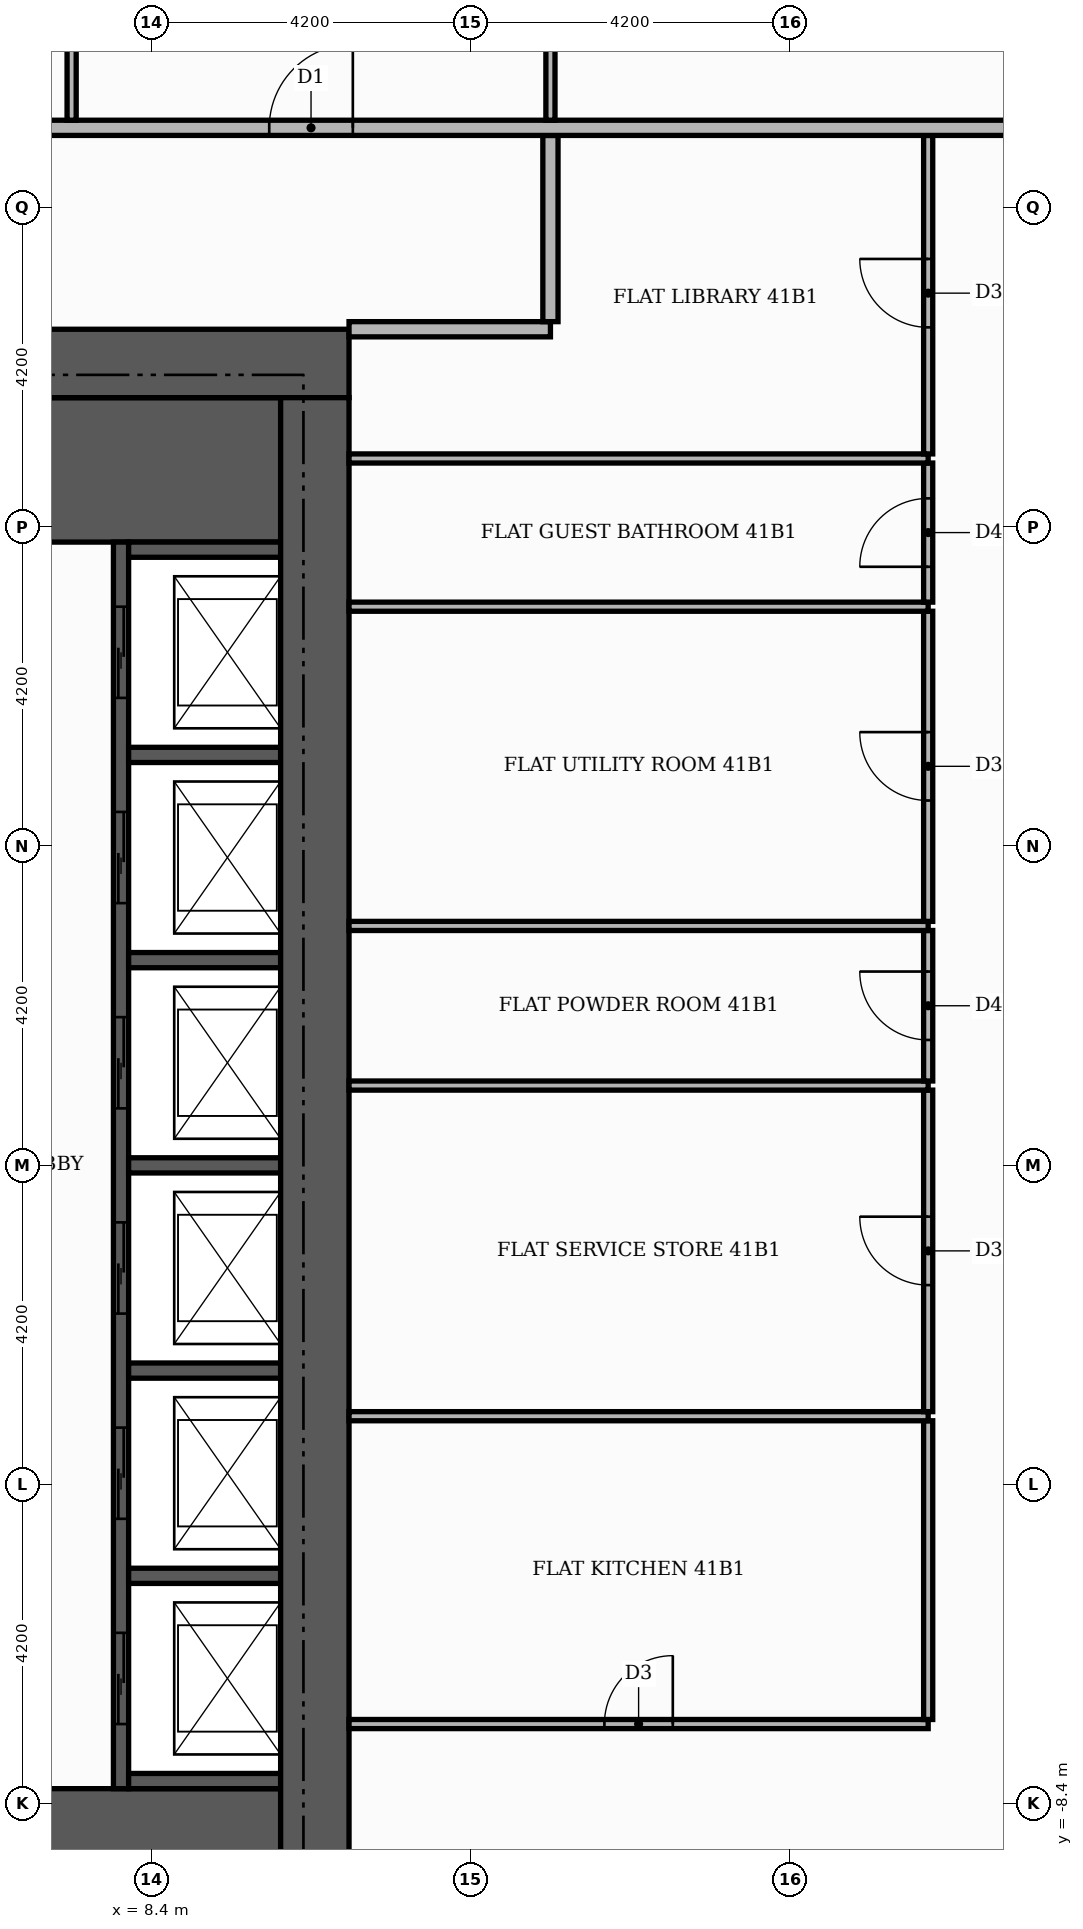
"""IFC4 building model, lengths in metres.
Left out: names, types, materials, properties, quantities, classifications, styles, units other than length and angle.
Written with IfcOpenShell. Run it as: python <this file> out.ifc"""

import sys

from ifc_helpers import new_model, si_unit, direction, frame, frame_2d, origin, place, context, subcontext, project, spatial, rectangle, extrude, element, fill, save


model = new_model("IFC4")
c1 = context("Model", 3, precision=1e-05, world=origin(), true_north=direction((0.0, 1.0)))
c2 = subcontext(c1, "Body", "Model", "MODEL_VIEW")
j1 = project(units=[si_unit("LENGTHUNIT", "METRE"), si_unit("PLANEANGLEUNIT", "RADIAN")], contexts=[c1])
p1 = place(None, origin())
s1 = spatial("IfcSite", under=j1, at=p1, CompositionType="ELEMENT")
p2 = place(p1, origin())
s2 = spatial("IfcBuilding", under=s1, at=p2, CompositionType="ELEMENT")
p3 = place(p2, frame((0.0, 0.0, 172.8)))
s3 = spatial("IfcBuildingStorey", under=s2, at=p3, CompositionType="ELEMENT", Elevation=172.8)
for number, where, z_axis, x_axis in (
    (1, (5.5, -9.15, 0.0), (0.0, 0.0, 1.0), (1.0, 0.0, 0.0)),
    (2, (5.5, 9.15, 0.0), (0.0, 0.0, 1.0), (1.0, 0.0, 0.0)),
):
    element("IfcWall", number, at=place(p3, frame(where, z_axis=z_axis, x_axis=x_axis)), inside=s3, PredefinedType="SHEAR", context=c2, shape_type="SweptSolid", body=[
        extrude(rectangle(XDim=4.6, YDim=1.9, at=frame_2d((2.3, 0.0))), origin(), (0.0, 0.0, 1.0), 3.48),
    ])
p4 = place(p3, frame((8.0, -8.2, 0.0), z_axis=(0.0, 0.0, 1.0), x_axis=(0.0, 1.0, 0.0)))
e3 = element("IfcWall", 3, at=p4, inside=s3, PredefinedType="SHEAR", context=c2, shape_type="SweptSolid", body=[
    extrude(rectangle(XDim=16.4, YDim=0.2, at=frame_2d((8.2, 0.0))), origin(), (0.0, 0.0, 1.0), 3.48),
])
p5 = place(p4, frame((0.85, 0.0, 0.0)))
e4 = element("IfcOpeningElement", 4, at=p5, cuts=e3, PredefinedType="OPENING", context=c2, shape_type="SweptSolid", body=[
    extrude(rectangle(XDim=1.2, YDim=2.1, at=frame_2d((0.6, 1.05))), frame((0.0, 0.11, 0.0), z_axis=(0.0, -1.0, 0.0), x_axis=(1.0, 0.0, 0.0)), (0.0, 0.0, 1.0), 0.22),
])
p6 = place(p4, frame((3.55, 0.0, 0.0)))
e5 = element("IfcOpeningElement", 5, at=p6, cuts=e3, PredefinedType="OPENING", context=c2, shape_type="SweptSolid", body=[
    extrude(rectangle(XDim=1.2, YDim=2.1, at=frame_2d((0.6, 1.05))), frame((0.0, 0.11, 0.0), z_axis=(0.0, -1.0, 0.0), x_axis=(1.0, 0.0, 0.0)), (0.0, 0.0, 1.0), 0.22),
])
p7 = place(p4, frame((6.25, 0.0, 0.0)))
e6 = element("IfcOpeningElement", 6, at=p7, cuts=e3, PredefinedType="OPENING", context=c2, shape_type="SweptSolid", body=[
    extrude(rectangle(XDim=1.2, YDim=2.1, at=frame_2d((0.6, 1.05))), frame((0.0, 0.11, 0.0), z_axis=(0.0, -1.0, 0.0), x_axis=(1.0, 0.0, 0.0)), (0.0, 0.0, 1.0), 0.22),
])
p8 = place(p4, frame((8.95, 0.0, 0.0)))
e7 = element("IfcOpeningElement", 7, at=p8, cuts=e3, PredefinedType="OPENING", context=c2, shape_type="SweptSolid", body=[
    extrude(rectangle(XDim=1.2, YDim=2.1, at=frame_2d((0.6, 1.05))), frame((0.0, 0.11, 0.0), z_axis=(0.0, -1.0, 0.0), x_axis=(1.0, 0.0, 0.0)), (0.0, 0.0, 1.0), 0.22),
])
p9 = place(p4, frame((11.65, 0.0, 0.0)))
e8 = element("IfcOpeningElement", 8, at=p9, cuts=e3, PredefinedType="OPENING", context=c2, shape_type="SweptSolid", body=[
    extrude(rectangle(XDim=1.2, YDim=2.1, at=frame_2d((0.6, 1.05))), frame((0.0, 0.11, 0.0), z_axis=(0.0, -1.0, 0.0), x_axis=(1.0, 0.0, 0.0)), (0.0, 0.0, 1.0), 0.22),
])
p10 = place(p4, frame((14.35, 0.0, 0.0)))
e9 = element("IfcOpeningElement", 9, at=p10, cuts=e3, PredefinedType="OPENING", context=c2, shape_type="SweptSolid", body=[
    extrude(rectangle(XDim=1.2, YDim=2.1, at=frame_2d((0.6, 1.05))), frame((0.0, 0.11, 0.0), z_axis=(0.0, -1.0, 0.0), x_axis=(1.0, 0.0, 0.0)), (0.0, 0.0, 1.0), 0.22),
])
for number, where, z_axis, x_axis in (
    (10, (8.1, -8.1, 0.0), (0.0, 0.0, 1.0), (1.0, 0.0, 0.0)),
    (11, (8.1, -5.4, 0.0), (0.0, 0.0, 1.0), (1.0, 0.0, 0.0)),
    (12, (8.1, -2.7, 0.0), (0.0, 0.0, 1.0), (1.0, 0.0, 0.0)),
    (13, (8.1, 0.0, 0.0), (0.0, 0.0, 1.0), (1.0, 0.0, 0.0)),
    (14, (8.1, 2.7, 0.0), (0.0, 0.0, 1.0), (1.0, 0.0, 0.0)),
    (15, (8.1, 5.4, 0.0), (0.0, 0.0, 1.0), (1.0, 0.0, 0.0)),
    (16, (8.1, 8.1, 0.0), (0.0, 0.0, 1.0), (1.0, 0.0, 0.0)),
):
    element("IfcWall", number, at=place(p3, frame(where, z_axis=z_axis, x_axis=x_axis)), inside=s3, PredefinedType="SHEAR", context=c2, shape_type="SweptSolid", body=[
        extrude(rectangle(XDim=2.0, YDim=0.2, at=frame_2d((1.0, 0.0))), origin(), (0.0, 0.0, 1.0), 3.48),
    ])
p11 = place(p3, frame((-11.0, 10.55, 0.0), z_axis=(0.0, 0.0, 1.0), x_axis=(1.0, 0.0, 0.0)))
e17 = element("IfcWall", 17, at=p11, inside=s3, PredefinedType="SHEAR", context=c2, shape_type="SweptSolid", body=[
    extrude(rectangle(XDim=22.0, YDim=0.9, at=frame_2d((11.0, 0.0))), origin(), (0.0, 0.0, 1.0), 3.48),
])
p12 = place(p11, frame((13.3, 0.0, 0.0)))
e18 = element("IfcOpeningElement", 18, at=p12, cuts=e17, PredefinedType="OPENING", context=c2, shape_type="SweptSolid", body=[
    extrude(rectangle(XDim=1.8, YDim=2.2, at=frame_2d((0.9, 1.1))), frame((0.0, 0.46, 0.0), z_axis=(0.0, -1.0, 0.0), x_axis=(1.0, 0.0, 0.0)), (0.0, 0.0, 1.0), 0.92),
])
p13 = place(p3, frame((10.55, -10.1, 0.0), z_axis=(0.0, 0.0, 1.0), x_axis=(0.0, 1.0, 0.0)))
e19 = element("IfcWall", 19, at=p13, inside=s3, PredefinedType="SHEAR", context=c2, shape_type="SweptSolid", body=[
    extrude(rectangle(XDim=20.2, YDim=0.9, at=frame_2d((10.1, 0.0))), origin(), (0.0, 0.0, 1.0), 3.48),
])
p14 = place(p3, frame((11.0, -7.35, 0.0), z_axis=(0.0, 0.0, 1.0), x_axis=(1.0, 0.0, 0.0)))
e20 = element("IfcWall", 20, at=p14, inside=s3, PredefinedType="PARTITIONING", context=c2, shape_type="SweptSolid", body=[
    extrude(rectangle(XDim=7.62, YDim=0.12, at=frame_2d((3.81, 0.0))), origin(), (0.0, 0.0, 1.0), 3.48),
])
p15 = place(p14, frame((3.36, 0.0, 0.0)))
e21 = element("IfcOpeningElement", 21, at=p15, cuts=e20, PredefinedType="OPENING", context=c2, shape_type="SweptSolid", body=[
    extrude(rectangle(XDim=0.9, YDim=2.1, at=frame_2d((0.45, 1.05))), frame((0.0, 0.07, 0.0), z_axis=(0.0, -1.0, 0.0), x_axis=(1.0, 0.0, 0.0)), (0.0, 0.0, 1.0), 0.14),
])
p16 = place(p3, frame((18.62, -7.29, 0.0), z_axis=(0.0, 0.0, 1.0), x_axis=(0.0, 1.0, 0.0)))
e22 = element("IfcWall", 22, at=p16, inside=s3, PredefinedType="PARTITIONING", context=c2, shape_type="SweptSolid", body=[
    extrude(rectangle(XDim=3.93, YDim=0.12, at=frame_2d((1.965, 0.0))), origin(), (0.0, 0.0, 1.0), 3.48),
])
p17 = place(p3, frame((11.0, -3.3, 0.0), z_axis=(0.0, 0.0, 1.0), x_axis=(1.0, 0.0, 0.0)))
e23 = element("IfcWall", 23, at=p17, inside=s3, PredefinedType="PARTITIONING", context=c2, shape_type="SweptSolid", body=[
    extrude(rectangle(XDim=7.62, YDim=0.12, at=frame_2d((3.81, 0.0))), origin(), (0.0, 0.0, 1.0), 3.48),
])
p18 = place(p3, frame((18.62, -3.24, 0.0), z_axis=(0.0, 0.0, 1.0), x_axis=(0.0, 1.0, 0.0)))
e24 = element("IfcWall", 24, at=p18, inside=s3, PredefinedType="PARTITIONING", context=c2, shape_type="SweptSolid", body=[
    extrude(rectangle(XDim=4.23, YDim=0.12, at=frame_2d((2.115, 0.0))), origin(), (0.0, 0.0, 1.0), 3.48),
])
p19 = place(p18, frame((1.665, 0.0, 0.0)))
e25 = element("IfcOpeningElement", 25, at=p19, cuts=e24, PredefinedType="OPENING", context=c2, shape_type="SweptSolid", body=[
    extrude(rectangle(XDim=0.9, YDim=2.1, at=frame_2d((0.45, 1.05))), frame((0.0, 0.07, 0.0), z_axis=(0.0, -1.0, 0.0), x_axis=(1.0, 0.0, 0.0)), (0.0, 0.0, 1.0), 0.14),
])
p20 = place(p3, frame((11.0, 1.05, 0.0), z_axis=(0.0, 0.0, 1.0), x_axis=(1.0, 0.0, 0.0)))
e26 = element("IfcWall", 26, at=p20, inside=s3, PredefinedType="PARTITIONING", context=c2, shape_type="SweptSolid", body=[
    extrude(rectangle(XDim=7.62, YDim=0.12, at=frame_2d((3.81, 0.0))), origin(), (0.0, 0.0, 1.0), 3.48),
])
p21 = place(p3, frame((18.62, 1.11, 0.0), z_axis=(0.0, 0.0, 1.0), x_axis=(0.0, 1.0, 0.0)))
e27 = element("IfcWall", 27, at=p21, inside=s3, PredefinedType="PARTITIONING", context=c2, shape_type="SweptSolid", body=[
    extrude(rectangle(XDim=1.98, YDim=0.12, at=frame_2d((0.99, 0.0))), origin(), (0.0, 0.0, 1.0), 3.48),
])
p22 = place(p21, frame((0.54, 0.0, 0.0)))
e28 = element("IfcOpeningElement", 28, at=p22, cuts=e27, PredefinedType="OPENING", context=c2, shape_type="SweptSolid", body=[
    extrude(rectangle(XDim=0.9, YDim=2.1, at=frame_2d((0.45, 1.05))), frame((0.0, 0.07, 0.0), z_axis=(0.0, -1.0, 0.0), x_axis=(1.0, 0.0, 0.0)), (0.0, 0.0, 1.0), 0.14),
])
p23 = place(p3, frame((11.0, 3.15, 0.0), z_axis=(0.0, 0.0, 1.0), x_axis=(1.0, 0.0, 0.0)))
e29 = element("IfcWall", 29, at=p23, inside=s3, PredefinedType="PARTITIONING", context=c2, shape_type="SweptSolid", body=[
    extrude(rectangle(XDim=7.62, YDim=0.12, at=frame_2d((3.81, 0.0))), origin(), (0.0, 0.0, 1.0), 3.48),
])
p24 = place(p3, frame((18.62, 3.21, 0.0), z_axis=(0.0, 0.0, 1.0), x_axis=(0.0, 1.0, 0.0)))
e30 = element("IfcWall", 30, at=p24, inside=s3, PredefinedType="PARTITIONING", context=c2, shape_type="SweptSolid", body=[
    extrude(rectangle(XDim=4.08, YDim=0.12, at=frame_2d((2.04, 0.0))), origin(), (0.0, 0.0, 1.0), 3.48),
])
p25 = place(p24, frame((1.59, 0.0, 0.0)))
e31 = element("IfcOpeningElement", 31, at=p25, cuts=e30, PredefinedType="OPENING", context=c2, shape_type="SweptSolid", body=[
    extrude(rectangle(XDim=0.9, YDim=2.1, at=frame_2d((0.45, 1.05))), frame((0.0, 0.07, 0.0), z_axis=(0.0, -1.0, 0.0), x_axis=(1.0, 0.0, 0.0)), (0.0, 0.0, 1.0), 0.14),
])
p26 = place(p3, frame((11.0, 7.35, 0.0), z_axis=(0.0, 0.0, 1.0), x_axis=(1.0, 0.0, 0.0)))
e32 = element("IfcWall", 32, at=p26, inside=s3, PredefinedType="PARTITIONING", context=c2, shape_type="SweptSolid", body=[
    extrude(rectangle(XDim=7.62, YDim=0.12, at=frame_2d((3.81, 0.0))), origin(), (0.0, 0.0, 1.0), 3.48),
])
p27 = place(p3, frame((18.62, 7.41, 0.0), z_axis=(0.0, 0.0, 1.0), x_axis=(0.0, 1.0, 0.0)))
e33 = element("IfcWall", 33, at=p27, inside=s3, PredefinedType="PARTITIONING", context=c2, shape_type="SweptSolid", body=[
    extrude(rectangle(XDim=1.83, YDim=0.12, at=frame_2d((0.915, 0.0))), origin(), (0.0, 0.0, 1.0), 3.48),
])
p28 = place(p27, frame((0.465, 0.0, 0.0)))
e34 = element("IfcOpeningElement", 34, at=p28, cuts=e33, PredefinedType="OPENING", context=c2, shape_type="SweptSolid", body=[
    extrude(rectangle(XDim=0.9, YDim=2.1, at=frame_2d((0.45, 1.05))), frame((0.0, 0.07, 0.0), z_axis=(0.0, -1.0, 0.0), x_axis=(1.0, 0.0, 0.0)), (0.0, 0.0, 1.0), 0.14),
])
p29 = place(p3, frame((11.0, 9.3, 0.0), z_axis=(0.0, 0.0, 1.0), x_axis=(1.0, 0.0, 0.0)))
e35 = element("IfcWall", 35, at=p29, inside=s3, PredefinedType="PARTITIONING", context=c2, shape_type="SweptSolid", body=[
    extrude(rectangle(XDim=7.62, YDim=0.12, at=frame_2d((3.81, 0.0))), origin(), (0.0, 0.0, 1.0), 3.48),
])
p30 = place(p3, frame((18.62, 9.36, 0.0), z_axis=(0.0, 0.0, 1.0), x_axis=(0.0, 1.0, 0.0)))
e36 = element("IfcWall", 36, at=p30, inside=s3, PredefinedType="PARTITIONING", context=c2, shape_type="SweptSolid", body=[
    extrude(rectangle(XDim=4.19, YDim=0.12, at=frame_2d((2.095, 0.0))), origin(), (0.0, 0.0, 1.0), 3.48),
])
p31 = place(p30, frame((1.665, 0.0, 0.0)))
e37 = element("IfcOpeningElement", 37, at=p31, cuts=e36, PredefinedType="OPENING", context=c2, shape_type="SweptSolid", body=[
    extrude(rectangle(XDim=0.9, YDim=2.1, at=frame_2d((0.45, 1.05))), frame((0.0, 0.07, 0.0), z_axis=(0.0, -1.0, 0.0), x_axis=(1.0, 0.0, 0.0)), (0.0, 0.0, 1.0), 0.14),
])
p32 = place(p3, frame((11.0, 11.0, 0.0), z_axis=(0.0, 0.0, 1.0), x_axis=(1.0, 0.0, 0.0)))
e38 = element("IfcWall", 38, at=p32, inside=s3, PredefinedType="PARTITIONING", context=c2, shape_type="SweptSolid", body=[
    extrude(rectangle(XDim=2.65, YDim=0.2, at=frame_2d((1.325, 0.0))), origin(), (0.0, 0.0, 1.0), 3.48),
])
p33 = place(p3, frame((13.65, 11.1, 0.0), z_axis=(0.0, 0.0, 1.0), x_axis=(0.0, 1.0, 0.0)))
e39 = element("IfcWall", 39, at=p33, inside=s3, PredefinedType="PARTITIONING", context=c2, shape_type="SweptSolid", body=[
    extrude(rectangle(XDim=2.45, YDim=0.2, at=frame_2d((1.225, 0.0))), origin(), (0.0, 0.0, 1.0), 3.48),
])
p34 = place(p3, frame((-13.65, 13.65, 0.0), z_axis=(0.0, 0.0, 1.0), x_axis=(1.0, 0.0, 0.0)))
e40 = element("IfcWall", 40, at=p34, inside=s3, PredefinedType="PARTITIONING", context=c2, shape_type="SweptSolid", body=[
    extrude(rectangle(XDim=39.07, YDim=0.2, at=frame_2d((19.535, 0.0))), origin(), (0.0, 0.0, 1.0), 3.48),
])
p35 = place(p34, frame((23.6, 0.0, 0.0)))
e41 = element("IfcOpeningElement", 41, at=p35, cuts=e40, PredefinedType="OPENING", context=c2, shape_type="SweptSolid", body=[
    extrude(rectangle(XDim=1.1, YDim=2.4, at=frame_2d((0.55, 1.2))), frame((0.0, 0.11, 0.0), z_axis=(0.0, -1.0, 0.0), x_axis=(1.0, 0.0, 0.0)), (0.0, 0.0, 1.0), 0.22),
])
p36 = place(p3, frame((7.35, 13.75, 0.0), z_axis=(0.0, 0.0, 1.0), x_axis=(0.0, 1.0, 0.0)))
e42 = element("IfcWall", 42, at=p36, inside=s3, PredefinedType="PARTITIONING", context=c2, shape_type="SweptSolid", body=[
    extrude(rectangle(XDim=5.11, YDim=0.12, at=frame_2d((2.555, 0.0))), origin(), (0.0, 0.0, 1.0), 3.48),
])
p37 = place(p3, frame((13.65, 13.75, 0.0), z_axis=(0.0, 0.0, 1.0), x_axis=(0.0, 1.0, 0.0)))
e43 = element("IfcWall", 43, at=p37, inside=s3, PredefinedType="PARTITIONING", context=c2, shape_type="SweptSolid", body=[
    extrude(rectangle(XDim=6.669, YDim=0.12, at=frame_2d((3.334, 0.0))), origin(), (0.0, 0.0, 1.0), 3.48),
])
p38 = place(p37, frame((2.834, 0.0, 0.0)))
e44 = element("IfcOpeningElement", 44, at=p38, cuts=e43, PredefinedType="OPENING", context=c2, shape_type="SweptSolid", body=[
    extrude(rectangle(XDim=0.9, YDim=2.1, at=frame_2d((0.45, 1.05))), frame((0.0, 0.07, 0.0), z_axis=(0.0, -1.0, 0.0), x_axis=(1.0, 0.0, 0.0)), (0.0, 0.0, 1.0), 0.14),
])
p39 = place(p5, origin())
e45 = element("IfcDoor", 45, at=p39, inside=s3, OperationType="SLIDING_TO_LEFT", PredefinedType="DOOR", context=c2, shape_type="SweptSolid", body=[
    extrude(rectangle(XDim=1.2, YDim=2.1, at=frame_2d((0.6, 1.05))), frame((0.0, 0.025, 0.0), z_axis=(0.0, -1.0, 0.0), x_axis=(1.0, 0.0, 0.0)), (0.0, 0.0, 1.0), 0.05),
])
fill(e4, e45)
p40 = place(p6, origin())
e46 = element("IfcDoor", 46, at=p40, inside=s3, OperationType="SLIDING_TO_LEFT", PredefinedType="DOOR", context=c2, shape_type="SweptSolid", body=[
    extrude(rectangle(XDim=1.2, YDim=2.1, at=frame_2d((0.6, 1.05))), frame((0.0, 0.025, 0.0), z_axis=(0.0, -1.0, 0.0), x_axis=(1.0, 0.0, 0.0)), (0.0, 0.0, 1.0), 0.05),
])
fill(e5, e46)
p41 = place(p7, origin())
e47 = element("IfcDoor", 47, at=p41, inside=s3, OperationType="SLIDING_TO_LEFT", PredefinedType="DOOR", context=c2, shape_type="SweptSolid", body=[
    extrude(rectangle(XDim=1.2, YDim=2.1, at=frame_2d((0.6, 1.05))), frame((0.0, 0.025, 0.0), z_axis=(0.0, -1.0, 0.0), x_axis=(1.0, 0.0, 0.0)), (0.0, 0.0, 1.0), 0.05),
])
fill(e6, e47)
p42 = place(p8, origin())
e48 = element("IfcDoor", 48, at=p42, inside=s3, OperationType="SLIDING_TO_LEFT", PredefinedType="DOOR", context=c2, shape_type="SweptSolid", body=[
    extrude(rectangle(XDim=1.2, YDim=2.1, at=frame_2d((0.6, 1.05))), frame((0.0, 0.025, 0.0), z_axis=(0.0, -1.0, 0.0), x_axis=(1.0, 0.0, 0.0)), (0.0, 0.0, 1.0), 0.05),
])
fill(e7, e48)
p43 = place(p9, origin())
e49 = element("IfcDoor", 49, at=p43, inside=s3, OperationType="SLIDING_TO_LEFT", PredefinedType="DOOR", context=c2, shape_type="SweptSolid", body=[
    extrude(rectangle(XDim=1.2, YDim=2.1, at=frame_2d((0.6, 1.05))), frame((0.0, 0.025, 0.0), z_axis=(0.0, -1.0, 0.0), x_axis=(1.0, 0.0, 0.0)), (0.0, 0.0, 1.0), 0.05),
])
fill(e8, e49)
p44 = place(p10, origin())
e50 = element("IfcDoor", 50, at=p44, inside=s3, OperationType="SLIDING_TO_LEFT", PredefinedType="DOOR", context=c2, shape_type="SweptSolid", body=[
    extrude(rectangle(XDim=1.2, YDim=2.1, at=frame_2d((0.6, 1.05))), frame((0.0, 0.025, 0.0), z_axis=(0.0, -1.0, 0.0), x_axis=(1.0, 0.0, 0.0)), (0.0, 0.0, 1.0), 0.05),
])
fill(e9, e50)
p45 = place(p15, origin())
e51 = element("IfcDoor", 51, at=p45, inside=s3, OperationType="SINGLE_SWING_RIGHT", PredefinedType="DOOR", context=c2, shape_type="SweptSolid", body=[
    extrude(rectangle(XDim=0.9, YDim=2.1, at=frame_2d((0.45, 1.05))), frame((0.0, 0.025, 0.0), z_axis=(0.0, -1.0, 0.0), x_axis=(1.0, 0.0, 0.0)), (0.0, 0.0, 1.0), 0.05),
])
fill(e21, e51)
p46 = place(p19, origin())
e52 = element("IfcDoor", 52, at=p46, inside=s3, OperationType="SINGLE_SWING_RIGHT", PredefinedType="DOOR", context=c2, shape_type="SweptSolid", body=[
    extrude(rectangle(XDim=0.9, YDim=2.1, at=frame_2d((0.45, 1.05))), frame((0.0, 0.025, 0.0), z_axis=(0.0, -1.0, 0.0), x_axis=(1.0, 0.0, 0.0)), (0.0, 0.0, 1.0), 0.05),
])
fill(e25, e52)
p47 = place(p22, origin())
e53 = element("IfcDoor", 53, at=p47, inside=s3, OperationType="SINGLE_SWING_RIGHT", PredefinedType="DOOR", context=c2, shape_type="SweptSolid", body=[
    extrude(rectangle(XDim=0.9, YDim=2.1, at=frame_2d((0.45, 1.05))), frame((0.0, 0.025, 0.0), z_axis=(0.0, -1.0, 0.0), x_axis=(1.0, 0.0, 0.0)), (0.0, 0.0, 1.0), 0.05),
])
fill(e28, e53)
p48 = place(p25, origin())
e54 = element("IfcDoor", 54, at=p48, inside=s3, OperationType="SINGLE_SWING_RIGHT", PredefinedType="DOOR", context=c2, shape_type="SweptSolid", body=[
    extrude(rectangle(XDim=0.9, YDim=2.1, at=frame_2d((0.45, 1.05))), frame((0.0, 0.025, 0.0), z_axis=(0.0, -1.0, 0.0), x_axis=(1.0, 0.0, 0.0)), (0.0, 0.0, 1.0), 0.05),
])
fill(e31, e54)
p49 = place(p28, origin())
e55 = element("IfcDoor", 55, at=p49, inside=s3, OperationType="SINGLE_SWING_LEFT", PredefinedType="DOOR", context=c2, shape_type="SweptSolid", body=[
    extrude(rectangle(XDim=0.9, YDim=2.1, at=frame_2d((0.45, 1.05))), frame((0.0, 0.025, 0.0), z_axis=(0.0, -1.0, 0.0), x_axis=(1.0, 0.0, 0.0)), (0.0, 0.0, 1.0), 0.05),
])
fill(e34, e55)
p50 = place(p31, origin())
e56 = element("IfcDoor", 56, at=p50, inside=s3, OperationType="SINGLE_SWING_RIGHT", PredefinedType="DOOR", context=c2, shape_type="SweptSolid", body=[
    extrude(rectangle(XDim=0.9, YDim=2.1, at=frame_2d((0.45, 1.05))), frame((0.0, 0.025, 0.0), z_axis=(0.0, -1.0, 0.0), x_axis=(1.0, 0.0, 0.0)), (0.0, 0.0, 1.0), 0.05),
])
fill(e37, e56)
p51 = place(p35, origin())
e57 = element("IfcDoor", 57, at=p51, inside=s3, OperationType="SINGLE_SWING_RIGHT", PredefinedType="DOOR", context=c2, shape_type="SweptSolid", body=[
    extrude(rectangle(XDim=1.1, YDim=2.4, at=frame_2d((0.55, 1.2))), frame((0.0, 0.025, 0.0), z_axis=(0.0, -1.0, 0.0), x_axis=(1.0, 0.0, 0.0)), (0.0, 0.0, 1.0), 0.05),
])
fill(e41, e57)
save(model, sys.argv[1])
